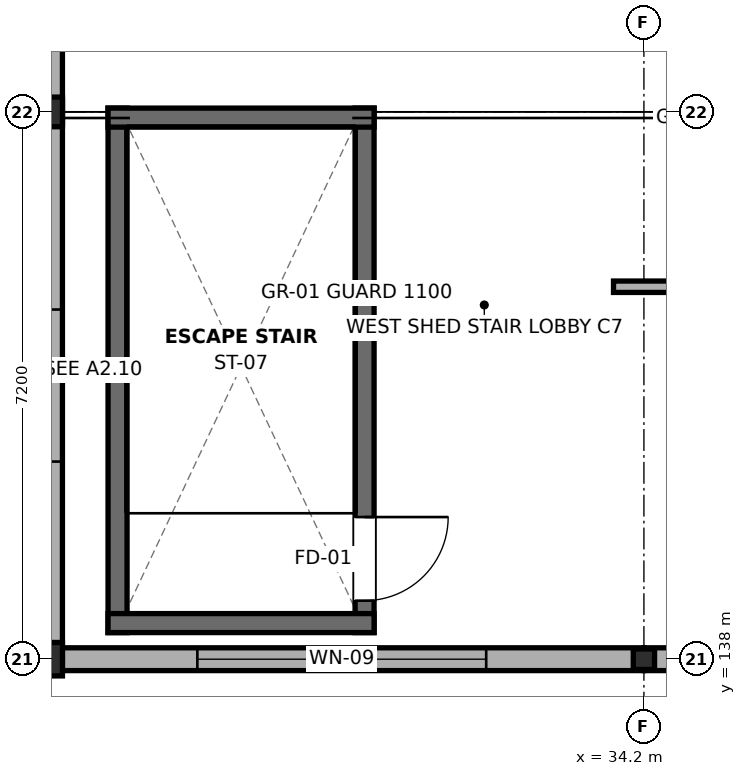
"""IFC4 building model, lengths in metres.
Left out: names, types, materials, properties, quantities, classifications, styles, units other than length and angle.
Written with IfcOpenShell. Run it as: python <this file> out.ifc"""

import sys

from ifc_helpers import new_model, si_unit, direction, frame, frame_2d, origin, origin_2d, place, context, subcontext, project, spatial, rectangle, i_section, extrude, element, fill, save


model = new_model("IFC4")
c1 = context("Model", 3, precision=1e-05, world=origin(), true_north=direction((0.0, 1.0)))
c2 = subcontext(c1, "Body", "Model", "MODEL_VIEW")
j1 = project(units=[si_unit("LENGTHUNIT", "METRE"), si_unit("PLANEANGLEUNIT", "RADIAN")], contexts=[c1])
p1 = place(None, origin())
s1 = spatial("IfcSite", under=j1, at=p1, CompositionType="ELEMENT")
p2 = place(p1, origin())
s2 = spatial("IfcBuilding", under=s1, at=p2, CompositionType="ELEMENT")
p3 = place(p2, frame((0.0, 0.0, 4.8)))
s3 = spatial("IfcBuildingStorey", under=s2, at=p3, CompositionType="ELEMENT", Elevation=4.8)
p4 = place(p3, frame((26.4, 138.0, 0.0), z_axis=(0.0, 0.0, 1.0), x_axis=(1.0, 0.0, 0.0)))
e1 = element("IfcColumn", 1, at=p4, inside=s3, PredefinedType="COLUMN", context=c2, shape_type="SweptSolid", body=[
    extrude(i_section(OverallWidth=0.3, OverallDepth=0.44, WebThickness=0.011, FlangeThickness=0.021, FilletRadius=0.027, at=origin_2d()), origin(), (0.0, 0.0, 1.0), 4.65),
])
p5 = place(p3, frame((26.4, 145.2, 0.0), z_axis=(0.0, 0.0, 1.0), x_axis=(1.0, 0.0, 0.0)))
e2 = element("IfcColumn", 2, at=p5, inside=s3, PredefinedType="COLUMN", context=c2, shape_type="SweptSolid", body=[
    extrude(i_section(OverallWidth=0.3, OverallDepth=0.39, WebThickness=0.011, FlangeThickness=0.019, FilletRadius=0.027, at=origin_2d()), origin(), (0.0, 0.0, 1.0), 4.65),
])
p6 = place(p3, frame((34.2, 138.0, 0.0), z_axis=(0.0, 0.0, 1.0), x_axis=(1.0, 0.0, 0.0)))
e3 = element("IfcColumn", 3, at=p6, inside=s3, PredefinedType="COLUMN", context=c2, shape_type="SweptSolid", body=[
    extrude(i_section(OverallWidth=0.28, OverallDepth=0.27, WebThickness=0.008, FlangeThickness=0.013, FilletRadius=0.024, at=origin_2d()), origin(), (0.0, 0.0, 1.0), 4.65),
])
p7 = place(p3, frame((26.25, 138.0, 0.0), z_axis=(0.0, 0.0, 1.0), x_axis=(1.0, 0.0, 0.0)))
e4 = element("IfcWall", 4, at=p7, inside=s3, PredefinedType="SOLIDWALL", context=c2, shape_type="SweptSolid", body=[
    extrude(rectangle(XDim=7.95, YDim=0.3, at=frame_2d((3.975, 0.0))), origin(), (0.0, 0.0, 1.0), 3.98),
])
p8 = place(p7, frame((2.075, 0.0, 1.35)))
e5 = element("IfcOpeningElement", 5, at=p8, cuts=e4, PredefinedType="OPENING", context=c2, shape_type="SweptSolid", body=[
    extrude(rectangle(XDim=3.8, YDim=1.6, at=frame_2d((1.9, 0.8))), frame((0.0, 0.165, 0.0), z_axis=(0.0, -1.0, 0.0), x_axis=(1.0, 0.0, 0.0)), (0.0, 0.0, 1.0), 0.33),
])
p9 = place(p3, frame((34.2, 138.0, 0.0), z_axis=(0.0, 0.0, 1.0), x_axis=(1.0, 0.0, 0.0)))
e6 = element("IfcWall", 6, at=p9, inside=s3, PredefinedType="SOLIDWALL", context=c2, shape_type="SweptSolid", body=[
    extrude(rectangle(XDim=6.0, YDim=0.3, at=frame_2d((3.0, 0.0))), origin(), (0.0, 0.0, 1.0), 3.98),
])
p10 = place(p9, frame((1.1, 0.0, 1.35)))
e7 = element("IfcOpeningElement", 7, at=p10, cuts=e6, PredefinedType="OPENING", context=c2, shape_type="SweptSolid", body=[
    extrude(rectangle(XDim=3.8, YDim=1.6, at=frame_2d((1.9, 0.8))), frame((0.0, 0.165, 0.0), z_axis=(0.0, -1.0, 0.0), x_axis=(1.0, 0.0, 0.0)), (0.0, 0.0, 1.0), 0.33),
])
p11 = place(p3, frame((26.4, 137.85, 0.0), z_axis=(0.0, 0.0, 1.0), x_axis=(0.0, 1.0, 0.0)))
e8 = element("IfcWall", 8, at=p11, inside=s3, PredefinedType="SOLIDWALL", context=c2, shape_type="SweptSolid", body=[
    extrude(rectangle(XDim=7.5, YDim=0.3, at=frame_2d((3.75, 0.0))), origin(), (0.0, 0.0, 1.0), 3.98),
])
p12 = place(p11, frame((2.75, 0.0, 1.1)))
e9 = element("IfcOpeningElement", 9, at=p12, cuts=e8, PredefinedType="OPENING", context=c2, shape_type="SweptSolid", body=[
    extrude(rectangle(XDim=2.0, YDim=1.8, at=frame_2d((1.0, 0.9))), frame((0.0, 0.165, 0.0), z_axis=(0.0, -1.0, 0.0), x_axis=(1.0, 0.0, 0.0)), (0.0, 0.0, 1.0), 0.33),
])
p13 = place(p3, frame((26.4, 145.05, -0.795), z_axis=(0.0, 0.0, 1.0), x_axis=(0.0, 1.0, 0.0)))
e10 = element("IfcWall", 10, at=p13, inside=s3, PredefinedType="SOLIDWALL", context=c2, shape_type="SweptSolid", body=[
    extrude(rectangle(XDim=7.35, YDim=0.3, at=frame_2d((3.675, 0.0))), origin(), (0.0, 0.0, 1.0), 4.775),
])
p14 = place(p13, frame((2.675, 0.0, 1.1)))
e11 = element("IfcOpeningElement", 11, at=p14, cuts=e10, PredefinedType="OPENING", context=c2, shape_type="SweptSolid", body=[
    extrude(rectangle(XDim=2.0, YDim=1.8, at=frame_2d((1.0, 0.9))), frame((0.0, 0.165, 0.0), z_axis=(0.0, -1.0, 0.0), x_axis=(1.0, 0.0, 0.0)), (0.0, 0.0, 1.0), 0.33),
])
p15 = place(p3, frame((27.275, 138.35, 0.0), z_axis=(0.0, 0.0, 1.0), x_axis=(0.0, 1.0, 0.0)))
e12 = element("IfcWall", 12, at=p15, inside=s3, PredefinedType="SHEAR", context=c2, shape_type="SweptSolid", body=[
    extrude(rectangle(XDim=6.9, YDim=0.25, at=frame_2d((3.45, 0.0))), origin(), (0.0, 0.0, 1.0), 4.25),
])
p16 = place(p3, frame((30.525, 138.35, 0.0), z_axis=(0.0, 0.0, 1.0), x_axis=(0.0, 1.0, 0.0)))
e13 = element("IfcWall", 13, at=p16, inside=s3, PredefinedType="SHEAR", context=c2, shape_type="SweptSolid", body=[
    extrude(rectangle(XDim=6.9, YDim=0.25, at=frame_2d((3.45, 0.0))), origin(), (0.0, 0.0, 1.0), 4.25),
])
p17 = place(p16, frame((0.42, 0.0, 0.0)))
e14 = element("IfcOpeningElement", 14, at=p17, cuts=e13, PredefinedType="OPENING", context=c2, shape_type="SweptSolid", body=[
    extrude(rectangle(XDim=1.1, YDim=2.15, at=frame_2d((0.55, 1.075))), frame((0.0, 0.14, 0.0), z_axis=(0.0, -1.0, 0.0), x_axis=(1.0, 0.0, 0.0)), (0.0, 0.0, 1.0), 0.28),
])
for number, where, z_axis, x_axis in (
    (15, (27.15, 138.475, 0.0), (0.0, 0.0, 1.0), (1.0, 0.0, 0.0)),
    (16, (27.15, 145.125, 0.0), (0.0, 0.0, 1.0), (1.0, 0.0, 0.0)),
):
    element("IfcWall", number, at=place(p3, frame(where, z_axis=z_axis, x_axis=x_axis)), inside=s3, PredefinedType="SHEAR", context=c2, shape_type="SweptSolid", body=[
        extrude(rectangle(XDim=3.5, YDim=0.25, at=frame_2d((1.75, 0.0))), origin(), (0.0, 0.0, 1.0), 4.25),
    ])
p18 = place(p3, frame((33.8, 142.9, 0.0), z_axis=(0.0, 0.0, 1.0), x_axis=(1.0, 0.0, 0.0)))
e17 = element("IfcWall", 17, at=p18, inside=s3, PredefinedType="PARTITIONING", context=c2, shape_type="SweptSolid", body=[
    extrude(rectangle(XDim=14.2, YDim=0.15, at=frame_2d((7.1, 0.0))), origin(), (0.0, 0.0, 1.0), 3.975),
])
p19 = place(p18, frame((2.6, 0.0, 0.0)))
e18 = element("IfcOpeningElement", 18, at=p19, cuts=e17, PredefinedType="OPENING", context=c2, shape_type="SweptSolid", body=[
    extrude(rectangle(XDim=1.6, YDim=2.15, at=frame_2d((0.8, 1.075))), frame((0.0, 0.09, 0.0), z_axis=(0.0, -1.0, 0.0), x_axis=(1.0, 0.0, 0.0)), (0.0, 0.0, 1.0), 0.18),
])
p20 = place(p18, frame((8.924, 0.0, 0.95)))
e19 = element("IfcOpeningElement", 19, at=p20, cuts=e17, PredefinedType="OPENING", context=c2, shape_type="SweptSolid", body=[
    extrude(rectangle(XDim=2.6, YDim=1.5, at=frame_2d((1.3, 0.75))), frame((0.0, 0.09, 0.0), z_axis=(0.0, -1.0, 0.0), x_axis=(1.0, 0.0, 0.0)), (0.0, 0.0, 1.0), 0.18),
])
p21 = place(p8, origin())
e20 = element("IfcWindow", 20, at=p21, inside=s3, PartitioningType="SINGLE_PANEL", PredefinedType="WINDOW", context=c2, shape_type="SweptSolid", body=[
    extrude(rectangle(XDim=3.8, YDim=1.6, at=frame_2d((1.9, 0.8))), frame((0.0, 0.03, 0.0), z_axis=(0.0, -1.0, 0.0), x_axis=(1.0, 0.0, 0.0)), (0.0, 0.0, 1.0), 0.06),
])
fill(e5, e20)
p22 = place(p12, origin())
e21 = element("IfcWindow", 21, at=p22, inside=s3, PartitioningType="SINGLE_PANEL", PredefinedType="WINDOW", context=c2, shape_type="SweptSolid", body=[
    extrude(rectangle(XDim=2.0, YDim=1.8, at=frame_2d((1.0, 0.9))), frame((0.0, 0.03, 0.0), z_axis=(0.0, -1.0, 0.0), x_axis=(1.0, 0.0, 0.0)), (0.0, 0.0, 1.0), 0.06),
])
fill(e9, e21)
p23 = place(p17, frame((1.1, 0.0, 0.0), z_axis=(0.0, 0.0, 1.0), x_axis=(-1.0, 0.0, 0.0)))
e22 = element("IfcDoor", 22, at=p23, inside=s3, OperationType="SINGLE_SWING_LEFT", PredefinedType="DOOR", context=c2, shape_type="SweptSolid", body=[
    extrude(rectangle(XDim=1.1, YDim=2.15, at=frame_2d((0.55, 1.075))), frame((0.0, 0.025, 0.0), z_axis=(0.0, -1.0, 0.0), x_axis=(1.0, 0.0, 0.0)), (0.0, 0.0, 1.0), 0.05),
])
fill(e14, e22)
save(model, sys.argv[1])
